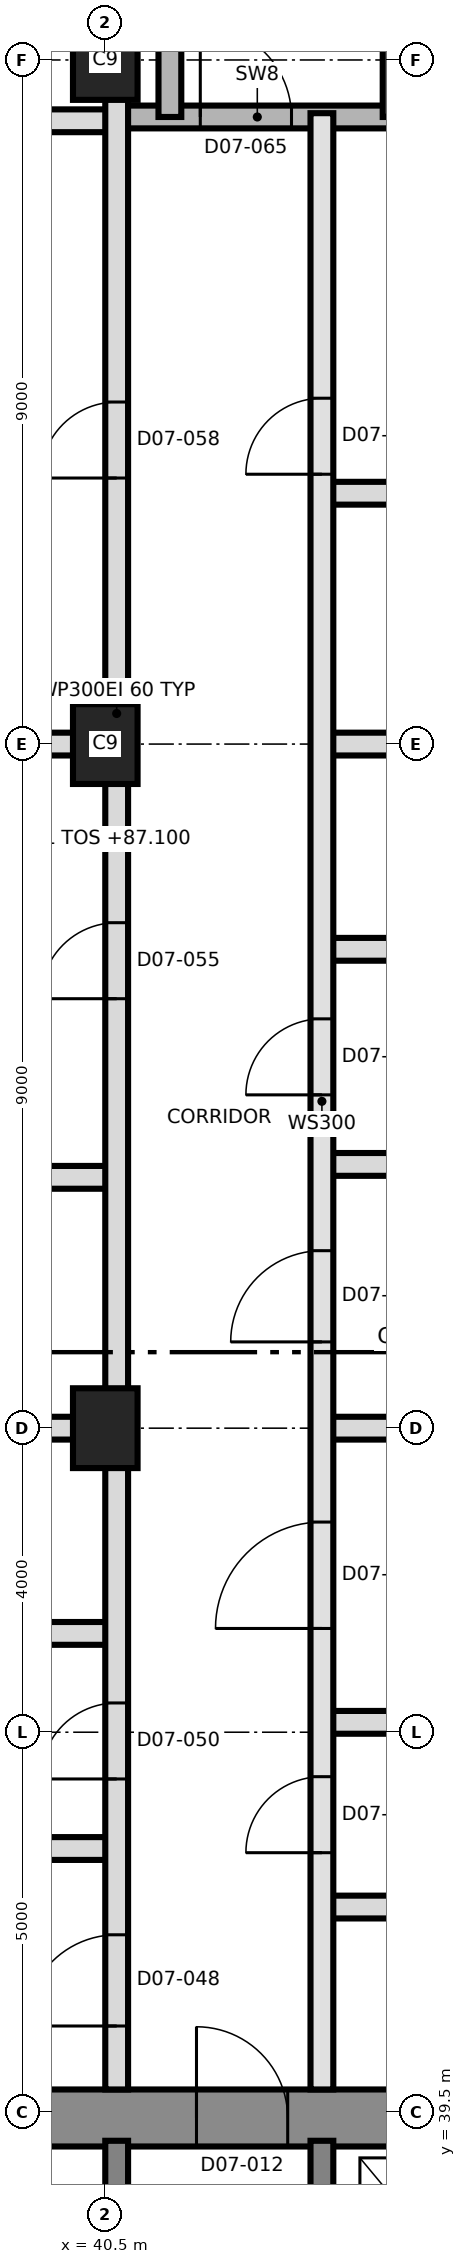
"""IFC4 building model, lengths in metres.
Left out: names, types, materials, properties, quantities, classifications, styles, units other than length and angle.
Written with IfcOpenShell. Run it as: python <this file> out.ifc"""

import sys

from ifc_helpers import new_model, si_unit, direction, frame, frame_2d, origin, origin_2d, place, context, subcontext, project, spatial, rectangle, extrude, element, fill, save


model = new_model("IFC4")
c1 = context("Model", 3, precision=1e-05, world=origin(), true_north=direction((0.0, 1.0)))
c2 = subcontext(c1, "Body", "Model", "MODEL_VIEW")
j1 = project(units=[si_unit("LENGTHUNIT", "METRE"), si_unit("PLANEANGLEUNIT", "RADIAN")], contexts=[c1])
p1 = place(None, origin())
s1 = spatial("IfcSite", under=j1, at=p1, CompositionType="ELEMENT")
p2 = place(p1, origin())
s2 = spatial("IfcBuilding", under=s1, at=p2, CompositionType="ELEMENT")
p3 = place(p2, frame((0.0, 0.0, 87.1)))
s3 = spatial("IfcBuildingStorey", under=s2, at=p3, CompositionType="ELEMENT", Elevation=87.1)
p4 = place(p3, frame((31.125, 39.425, 0.0), z_axis=(0.0, 0.0, 1.0), x_axis=(1.0, 0.0, 0.0)))
e1 = element("IfcWall", 1, at=p4, inside=s3, PredefinedType="SHEAR", context=c2, shape_type="SweptSolid", body=[
    extrude(rectangle(XDim=27.0, YDim=0.75, at=frame_2d((13.5, 0.0))), origin(), (0.0, 0.0, 1.0), 3.7),
])
p5 = place(p4, frame((10.575, 0.0, 0.0)))
e2 = element("IfcOpeningElement", 2, at=p5, cuts=e1, PredefinedType="OPENING", context=c2, shape_type="SweptSolid", body=[
    extrude(rectangle(XDim=1.2, YDim=2.1, at=frame_2d((0.6, 1.05))), frame((0.0, 0.385, 0.0), z_axis=(0.0, -1.0, 0.0), x_axis=(1.0, 0.0, 0.0)), (0.0, 0.0, 1.0), 0.77),
])
for number, where, z_axis, x_axis in (
    (3, (40.65, 33.5, 0.0), (0.0, 0.0, 1.0), (0.0, 1.0, 0.0)),
    (4, (43.35, 33.5, 0.0), (0.0, 0.0, 1.0), (0.0, 1.0, 0.0)),
):
    element("IfcWall", number, at=place(p3, frame(where, z_axis=z_axis, x_axis=x_axis)), inside=s3, PredefinedType="SHEAR", context=c2, shape_type="SweptSolid", body=[
        extrude(rectangle(XDim=5.625, YDim=0.3, at=frame_2d((2.812, 0.0))), origin(), (0.0, 0.0, 1.0), 3.7),
    ])
for number, where, z_axis, x_axis in (
    (5, (40.5, 48.5, 0.0), (0.0, 0.0, 1.0), (0.0, 1.0, 0.0)),
    (6, (40.5, 57.5, 0.0), (0.0, 0.0, 1.0), (0.0, 1.0, 0.0)),
    (7, (40.5, 66.5, 0.0), (0.0, 0.0, 1.0), (0.0, 1.0, 0.0)),
):
    element("IfcColumn", number, at=place(p3, frame(where, z_axis=z_axis, x_axis=x_axis)), inside=s3, PredefinedType="COLUMN", context=c2, shape_type="SweptSolid", body=[
        extrude(rectangle(XDim=1.05, YDim=0.85, at=origin_2d()), origin(), (0.0, 0.0, 1.0), 3.7),
    ])
p6 = place(p3, frame((43.35, 42.2, 0.0), z_axis=(0.0, 0.0, 1.0), x_axis=(1.0, 0.0, 0.0)))
e8 = element("IfcWall", 8, at=p6, inside=s3, PredefinedType="PARTITIONING", context=c2, shape_type="SweptSolid", body=[
    extrude(rectangle(XDim=3.2, YDim=0.3, at=frame_2d((1.6, 0.0))), origin(), (0.0, 0.0, 1.0), 3.4),
])
p7 = place(p3, frame((30.995, 42.97, 0.0), z_axis=(0.0, 0.0, 1.0), x_axis=(1.0, 0.0, 0.0)))
e9 = element("IfcWall", 9, at=p7, inside=s3, PredefinedType="PARTITIONING", context=c2, shape_type="SweptSolid", body=[
    extrude(rectangle(XDim=9.655, YDim=0.3, at=frame_2d((4.827, 0.0))), origin(), (0.0, 0.0, 1.0), 3.4),
])
p8 = place(p3, frame((43.35, 44.63, 0.0), z_axis=(0.0, 0.0, 1.0), x_axis=(1.0, 0.0, 0.0)))
e10 = element("IfcWall", 10, at=p8, inside=s3, PredefinedType="PARTITIONING", context=c2, shape_type="SweptSolid", body=[
    extrude(rectangle(XDim=7.032, YDim=0.3, at=frame_2d((3.516, 0.0))), origin(), (0.0, 0.0, 1.0), 3.4),
])
p9 = place(p3, frame((37.45, 45.8, 0.0), z_axis=(0.0, 0.0, 1.0), x_axis=(1.0, 0.0, 0.0)))
e11 = element("IfcWall", 11, at=p9, inside=s3, PredefinedType="PARTITIONING", context=c2, shape_type="SweptSolid", body=[
    extrude(rectangle(XDim=3.2, YDim=0.3, at=frame_2d((1.6, 0.0))), origin(), (0.0, 0.0, 1.0), 3.4),
])
p10 = place(p3, frame((30.995, 48.5, 0.0), z_axis=(0.0, 0.0, 1.0), x_axis=(1.0, 0.0, 0.0)))
e12 = element("IfcWall", 12, at=p10, inside=s3, PredefinedType="PARTITIONING", context=c2, shape_type="SweptSolid", body=[
    extrude(rectangle(XDim=9.655, YDim=0.3, at=frame_2d((4.827, 0.0))), origin(), (0.0, 0.0, 1.0), 3.4),
])
p11 = place(p3, frame((43.35, 48.5, 0.0), z_axis=(0.0, 0.0, 1.0), x_axis=(1.0, 0.0, 0.0)))
e13 = element("IfcWall", 13, at=p11, inside=s3, PredefinedType="PARTITIONING", context=c2, shape_type="SweptSolid", body=[
    extrude(rectangle(XDim=6.655, YDim=0.3, at=frame_2d((3.327, 0.0))), origin(), (0.0, 0.0, 1.0), 3.4),
])
p12 = place(p3, frame((37.15, 51.8, 0.0), z_axis=(0.0, 0.0, 1.0), x_axis=(1.0, 0.0, 0.0)))
e14 = element("IfcWall", 14, at=p12, inside=s3, PredefinedType="PARTITIONING", context=c2, shape_type="SweptSolid", body=[
    extrude(rectangle(XDim=3.5, YDim=0.3, at=frame_2d((1.75, 0.0))), origin(), (0.0, 0.0, 1.0), 3.4),
])
p13 = place(p3, frame((43.35, 51.97, 0.0), z_axis=(0.0, 0.0, 1.0), x_axis=(1.0, 0.0, 0.0)))
e15 = element("IfcWall", 15, at=p13, inside=s3, PredefinedType="PARTITIONING", context=c2, shape_type="SweptSolid", body=[
    extrude(rectangle(XDim=6.835, YDim=0.3, at=frame_2d((3.417, 0.0))), origin(), (0.0, 0.0, 1.0), 3.4),
])
p14 = place(p3, frame((43.35, 54.8, 0.0), z_axis=(0.0, 0.0, 1.0), x_axis=(1.0, 0.0, 0.0)))
e16 = element("IfcWall", 16, at=p14, inside=s3, PredefinedType="PARTITIONING", context=c2, shape_type="SweptSolid", body=[
    extrude(rectangle(XDim=3.2, YDim=0.3, at=frame_2d((1.6, 0.0))), origin(), (0.0, 0.0, 1.0), 3.4),
])
p15 = place(p3, frame((30.995, 57.5, 0.0), z_axis=(0.0, 0.0, 1.0), x_axis=(1.0, 0.0, 0.0)))
e17 = element("IfcWall", 17, at=p15, inside=s3, PredefinedType="PARTITIONING", context=c2, shape_type="SweptSolid", body=[
    extrude(rectangle(XDim=9.655, YDim=0.3, at=frame_2d((4.827, 0.0))), origin(), (0.0, 0.0, 1.0), 3.4),
])
p16 = place(p3, frame((43.35, 57.5, 0.0), z_axis=(0.0, 0.0, 1.0), x_axis=(1.0, 0.0, 0.0)))
e18 = element("IfcWall", 18, at=p16, inside=s3, PredefinedType="PARTITIONING", context=c2, shape_type="SweptSolid", body=[
    extrude(rectangle(XDim=6.655, YDim=0.3, at=frame_2d((3.327, 0.0))), origin(), (0.0, 0.0, 1.0), 3.4),
])
p17 = place(p3, frame((43.35, 60.8, 0.0), z_axis=(0.0, 0.0, 1.0), x_axis=(1.0, 0.0, 0.0)))
e19 = element("IfcWall", 19, at=p17, inside=s3, PredefinedType="PARTITIONING", context=c2, shape_type="SweptSolid", body=[
    extrude(rectangle(XDim=3.5, YDim=0.3, at=frame_2d((1.75, 0.0))), origin(), (0.0, 0.0, 1.0), 3.4),
])
p18 = place(p3, frame((30.995, 65.7, 0.0), z_axis=(0.0, 0.0, 1.0), x_axis=(1.0, 0.0, 0.0)))
e20 = element("IfcWall", 20, at=p18, inside=s3, PredefinedType="PARTITIONING", context=c2, shape_type="SweptSolid", body=[
    extrude(rectangle(XDim=9.655, YDim=0.3, at=frame_2d((4.827, 0.0))), origin(), (0.0, 0.0, 1.0), 3.4),
])
p19 = place(p18, frame((4.005, 0.0, 0.0)))
e21 = element("IfcOpeningElement", 21, at=p19, cuts=e20, PredefinedType="OPENING", context=c2, shape_type="SweptSolid", body=[
    extrude(rectangle(XDim=1.0, YDim=2.1, at=frame_2d((0.5, 1.05))), frame((0.0, 0.16, 0.0), z_axis=(0.0, -1.0, 0.0), x_axis=(1.0, 0.0, 0.0)), (0.0, 0.0, 1.0), 0.32),
])
p20 = place(p3, frame((40.65, 65.75, 0.0), z_axis=(0.0, 0.0, 1.0), x_axis=(1.0, 0.0, 0.0)))
e22 = element("IfcWall", 22, at=p20, inside=s3, PredefinedType="SHEAR", context=c2, shape_type="SweptSolid", body=[
    extrude(rectangle(XDim=3.7, YDim=0.3, at=frame_2d((1.85, 0.0))), origin(), (0.0, 0.0, 1.0), 3.4),
])
p21 = place(p20, frame((1.1, 0.0, 0.0)))
e23 = element("IfcOpeningElement", 23, at=p21, cuts=e22, PredefinedType="OPENING", context=c2, shape_type="SweptSolid", body=[
    extrude(rectangle(XDim=1.2, YDim=2.1, at=frame_2d((0.6, 1.05))), frame((0.0, 0.16, 0.0), z_axis=(0.0, -1.0, 0.0), x_axis=(1.0, 0.0, 0.0)), (0.0, 0.0, 1.0), 0.32),
])
p22 = place(p3, frame((40.65, 39.8, 0.0), z_axis=(0.0, 0.0, 1.0), x_axis=(0.0, 1.0, 0.0)))
e24 = element("IfcWall", 24, at=p22, inside=s3, PredefinedType="PARTITIONING", context=c2, shape_type="SweptSolid", body=[
    extrude(rectangle(XDim=36.205, YDim=0.3, at=frame_2d((18.103, 0.0))), origin(), (0.0, 0.0, 1.0), 3.4),
])
p23 = place(p22, frame((0.835, 0.0, 0.0)))
e25 = element("IfcOpeningElement", 25, at=p23, cuts=e24, PredefinedType="OPENING", context=c2, shape_type="SweptSolid", body=[
    extrude(rectangle(XDim=1.2, YDim=2.1, at=frame_2d((0.6, 1.05))), frame((0.0, 0.16, 0.0), z_axis=(0.0, -1.0, 0.0), x_axis=(1.0, 0.0, 0.0)), (0.0, 0.0, 1.0), 0.32),
])
p24 = place(p22, frame((4.085, 0.0, 0.0)))
e26 = element("IfcOpeningElement", 26, at=p24, cuts=e24, PredefinedType="OPENING", context=c2, shape_type="SweptSolid", body=[
    extrude(rectangle(XDim=1.0, YDim=2.1, at=frame_2d((0.5, 1.05))), frame((0.0, 0.16, 0.0), z_axis=(0.0, -1.0, 0.0), x_axis=(1.0, 0.0, 0.0)), (0.0, 0.0, 1.0), 0.32),
])
p25 = place(p22, frame((14.35, 0.0, 0.0)))
e27 = element("IfcOpeningElement", 27, at=p25, cuts=e24, PredefinedType="OPENING", context=c2, shape_type="SweptSolid", body=[
    extrude(rectangle(XDim=1.0, YDim=2.4, at=frame_2d((0.5, 1.2))), frame((0.0, 0.16, 0.0), z_axis=(0.0, -1.0, 0.0), x_axis=(1.0, 0.0, 0.0)), (0.0, 0.0, 1.0), 0.32),
])
p26 = place(p22, frame((21.2, 0.0, 0.0)))
e28 = element("IfcOpeningElement", 28, at=p26, cuts=e24, PredefinedType="OPENING", context=c2, shape_type="SweptSolid", body=[
    extrude(rectangle(XDim=1.0, YDim=2.4, at=frame_2d((0.5, 1.2))), frame((0.0, 0.16, 0.0), z_axis=(0.0, -1.0, 0.0), x_axis=(1.0, 0.0, 0.0)), (0.0, 0.0, 1.0), 0.32),
])
p27 = place(p3, frame((41.35, 65.75, 0.0), z_axis=(0.0, 0.0, 1.0), x_axis=(0.0, 1.0, 0.0)))
e29 = element("IfcWall", 29, at=p27, inside=s3, PredefinedType="SHEAR", context=c2, shape_type="SweptSolid", body=[
    extrude(rectangle(XDim=8.85, YDim=0.3, at=frame_2d((4.425, 0.0))), origin(), (0.0, 0.0, 1.0), 3.4),
])
p28 = place(p3, frame((43.35, 39.8, 0.0), z_axis=(0.0, 0.0, 1.0), x_axis=(0.0, 1.0, 0.0)))
e30 = element("IfcWall", 30, at=p28, inside=s3, PredefinedType="SOLIDWALL", context=c2, shape_type="SweptSolid", body=[
    extrude(rectangle(XDim=26.0, YDim=0.3, at=frame_2d((13.0, 0.0))), origin(), (0.0, 0.0, 1.0), 3.4),
])
p29 = place(p28, frame((3.115, 0.0, 0.0)))
e31 = element("IfcOpeningElement", 31, at=p29, cuts=e30, PredefinedType="OPENING", context=c2, shape_type="SweptSolid", body=[
    extrude(rectangle(XDim=1.0, YDim=2.1, at=frame_2d((0.5, 1.05))), frame((0.0, 0.16, 0.0), z_axis=(0.0, -1.0, 0.0), x_axis=(1.0, 0.0, 0.0)), (0.0, 0.0, 1.0), 0.32),
])
p30 = place(p28, frame((6.065, 0.0, 0.0)))
e32 = element("IfcOpeningElement", 32, at=p30, cuts=e30, PredefinedType="OPENING", context=c2, shape_type="SweptSolid", body=[
    extrude(rectangle(XDim=1.4, YDim=2.1, at=frame_2d((0.7, 1.05))), frame((0.0, 0.16, 0.0), z_axis=(0.0, -1.0, 0.0), x_axis=(1.0, 0.0, 0.0)), (0.0, 0.0, 1.0), 0.32),
])
p31 = place(p28, frame((9.835, 0.0, 0.0)))
e33 = element("IfcOpeningElement", 33, at=p31, cuts=e30, PredefinedType="OPENING", context=c2, shape_type="SweptSolid", body=[
    extrude(rectangle(XDim=1.2, YDim=2.1, at=frame_2d((0.6, 1.05))), frame((0.0, 0.16, 0.0), z_axis=(0.0, -1.0, 0.0), x_axis=(1.0, 0.0, 0.0)), (0.0, 0.0, 1.0), 0.32),
])
p32 = place(p28, frame((13.085, 0.0, 0.0)))
e34 = element("IfcOpeningElement", 34, at=p32, cuts=e30, PredefinedType="OPENING", context=c2, shape_type="SweptSolid", body=[
    extrude(rectangle(XDim=1.0, YDim=2.1, at=frame_2d((0.5, 1.05))), frame((0.0, 0.16, 0.0), z_axis=(0.0, -1.0, 0.0), x_axis=(1.0, 0.0, 0.0)), (0.0, 0.0, 1.0), 0.32),
])
p33 = place(p28, frame((21.25, 0.0, 0.0)))
e35 = element("IfcOpeningElement", 35, at=p33, cuts=e30, PredefinedType="OPENING", context=c2, shape_type="SweptSolid", body=[
    extrude(rectangle(XDim=1.0, YDim=2.4, at=frame_2d((0.5, 1.2))), frame((0.0, 0.16, 0.0), z_axis=(0.0, -1.0, 0.0), x_axis=(1.0, 0.0, 0.0)), (0.0, 0.0, 1.0), 0.32),
])
p34 = place(p3, frame((44.3, 65.75, 0.0), z_axis=(0.0, 0.0, 1.0), x_axis=(0.0, 1.0, 0.0)))
e36 = element("IfcWall", 36, at=p34, inside=s3, PredefinedType="SHEAR", context=c2, shape_type="SweptSolid", body=[
    extrude(rectangle(XDim=8.85, YDim=0.3, at=frame_2d((4.425, 0.0))), origin(), (0.0, 0.0, 1.0), 3.4),
])
p35 = place(p5, origin())
e37 = element("IfcDoor", 37, at=p35, inside=s3, OperationType="SINGLE_SWING_RIGHT", PredefinedType="DOOR", context=c2, shape_type="SweptSolid", body=[
    extrude(rectangle(XDim=1.2, YDim=2.1, at=frame_2d((0.6, 1.05))), frame((0.0, 0.025, 0.0), z_axis=(0.0, -1.0, 0.0), x_axis=(1.0, 0.0, 0.0)), (0.0, 0.0, 1.0), 0.05),
])
fill(e2, e37)
p36 = place(p29, origin())
e38 = element("IfcDoor", 38, at=p36, inside=s3, OperationType="SINGLE_SWING_LEFT", PredefinedType="DOOR", context=c2, shape_type="SweptSolid", body=[
    extrude(rectangle(XDim=1.0, YDim=2.1, at=frame_2d((0.5, 1.05))), frame((0.0, 0.025, 0.0), z_axis=(0.0, -1.0, 0.0), x_axis=(1.0, 0.0, 0.0)), (0.0, 0.0, 1.0), 0.05),
])
fill(e31, e38)
p37 = place(p30, origin())
e39 = element("IfcDoor", 39, at=p37, inside=s3, OperationType="SINGLE_SWING_LEFT", PredefinedType="DOOR", context=c2, shape_type="SweptSolid", body=[
    extrude(rectangle(XDim=1.4, YDim=2.1, at=frame_2d((0.7, 1.05))), frame((0.0, 0.025, 0.0), z_axis=(0.0, -1.0, 0.0), x_axis=(1.0, 0.0, 0.0)), (0.0, 0.0, 1.0), 0.05),
])
fill(e32, e39)
p38 = place(p23, origin())
e40 = element("IfcDoor", 40, at=p38, inside=s3, OperationType="SINGLE_SWING_LEFT", PredefinedType="DOOR", context=c2, shape_type="SweptSolid", body=[
    extrude(rectangle(XDim=1.2, YDim=2.1, at=frame_2d((0.6, 1.05))), frame((0.0, 0.025, 0.0), z_axis=(0.0, -1.0, 0.0), x_axis=(1.0, 0.0, 0.0)), (0.0, 0.0, 1.0), 0.05),
])
fill(e25, e40)
p39 = place(p24, origin())
e41 = element("IfcDoor", 41, at=p39, inside=s3, OperationType="SINGLE_SWING_RIGHT", PredefinedType="DOOR", context=c2, shape_type="SweptSolid", body=[
    extrude(rectangle(XDim=1.0, YDim=2.1, at=frame_2d((0.5, 1.05))), frame((0.0, 0.025, 0.0), z_axis=(0.0, -1.0, 0.0), x_axis=(1.0, 0.0, 0.0)), (0.0, 0.0, 1.0), 0.05),
])
fill(e26, e41)
p40 = place(p31, origin())
e42 = element("IfcDoor", 42, at=p40, inside=s3, OperationType="SINGLE_SWING_LEFT", PredefinedType="DOOR", context=c2, shape_type="SweptSolid", body=[
    extrude(rectangle(XDim=1.2, YDim=2.1, at=frame_2d((0.6, 1.05))), frame((0.0, 0.025, 0.0), z_axis=(0.0, -1.0, 0.0), x_axis=(1.0, 0.0, 0.0)), (0.0, 0.0, 1.0), 0.05),
])
fill(e33, e42)
p41 = place(p32, origin())
e43 = element("IfcDoor", 43, at=p41, inside=s3, OperationType="SINGLE_SWING_RIGHT", PredefinedType="DOOR", context=c2, shape_type="SweptSolid", body=[
    extrude(rectangle(XDim=1.0, YDim=2.1, at=frame_2d((0.5, 1.05))), frame((0.0, 0.025, 0.0), z_axis=(0.0, -1.0, 0.0), x_axis=(1.0, 0.0, 0.0)), (0.0, 0.0, 1.0), 0.05),
])
fill(e34, e43)
p42 = place(p25, origin())
e44 = element("IfcDoor", 44, at=p42, inside=s3, OperationType="SINGLE_SWING_LEFT", PredefinedType="DOOR", context=c2, shape_type="SweptSolid", body=[
    extrude(rectangle(XDim=1.0, YDim=2.4, at=frame_2d((0.5, 1.2))), frame((0.0, 0.025, 0.0), z_axis=(0.0, -1.0, 0.0), x_axis=(1.0, 0.0, 0.0)), (0.0, 0.0, 1.0), 0.05),
])
fill(e27, e44)
p43 = place(p33, origin())
e45 = element("IfcDoor", 45, at=p43, inside=s3, OperationType="SINGLE_SWING_LEFT", PredefinedType="DOOR", context=c2, shape_type="SweptSolid", body=[
    extrude(rectangle(XDim=1.0, YDim=2.4, at=frame_2d((0.5, 1.2))), frame((0.0, 0.025, 0.0), z_axis=(0.0, -1.0, 0.0), x_axis=(1.0, 0.0, 0.0)), (0.0, 0.0, 1.0), 0.05),
])
fill(e35, e45)
p44 = place(p26, origin())
e46 = element("IfcDoor", 46, at=p44, inside=s3, OperationType="SINGLE_SWING_RIGHT", PredefinedType="DOOR", context=c2, shape_type="SweptSolid", body=[
    extrude(rectangle(XDim=1.0, YDim=2.4, at=frame_2d((0.5, 1.2))), frame((0.0, 0.025, 0.0), z_axis=(0.0, -1.0, 0.0), x_axis=(1.0, 0.0, 0.0)), (0.0, 0.0, 1.0), 0.05),
])
fill(e28, e46)
p45 = place(p21, origin())
e47 = element("IfcDoor", 47, at=p45, inside=s3, OperationType="SINGLE_SWING_RIGHT", PredefinedType="DOOR", context=c2, shape_type="SweptSolid", body=[
    extrude(rectangle(XDim=1.2, YDim=2.1, at=frame_2d((0.6, 1.05))), frame((0.0, 0.025, 0.0), z_axis=(0.0, -1.0, 0.0), x_axis=(1.0, 0.0, 0.0)), (0.0, 0.0, 1.0), 0.05),
])
fill(e23, e47)
save(model, sys.argv[1])
